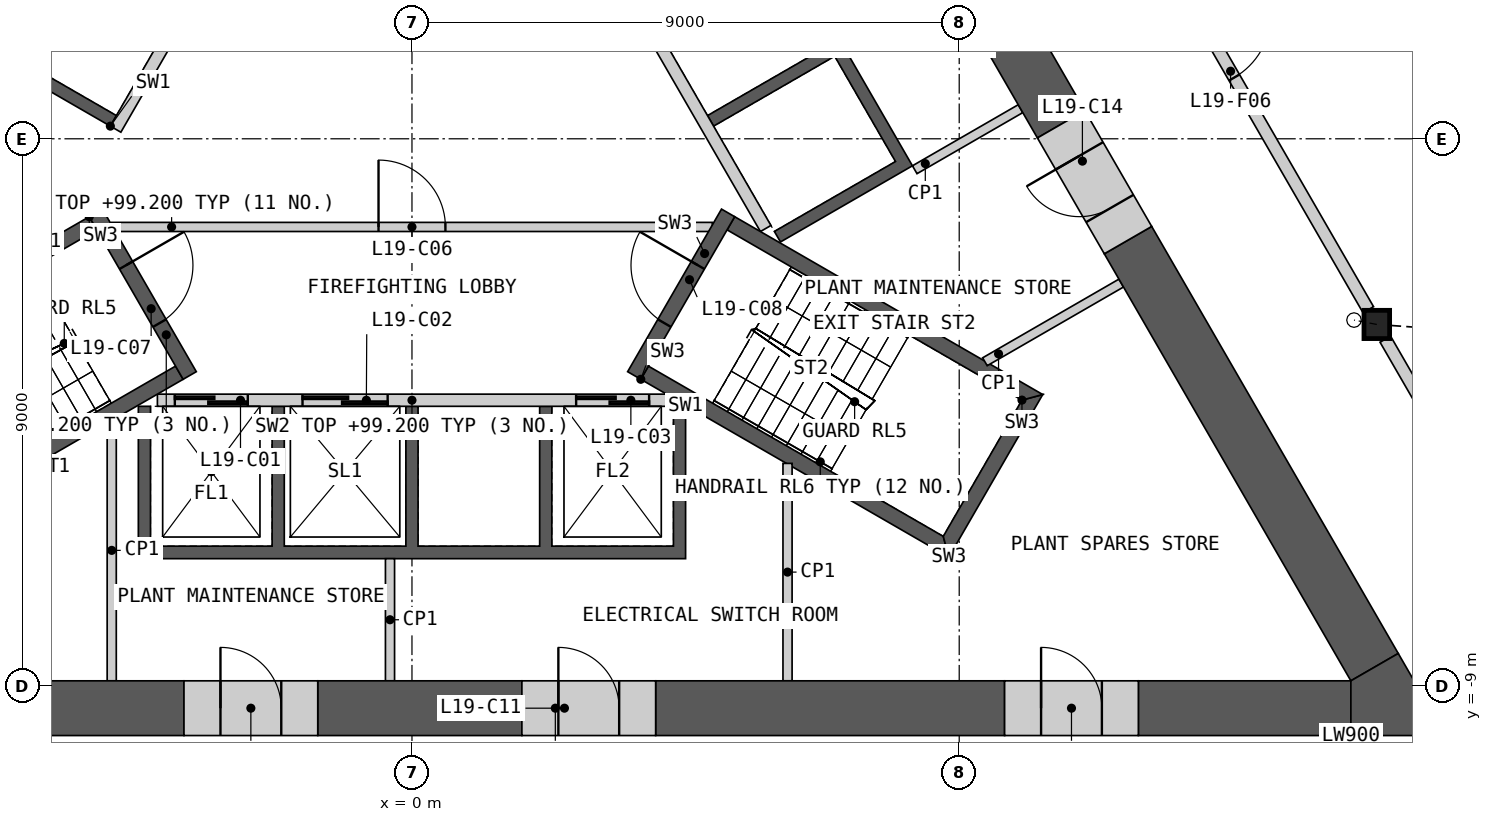
"""IFC4 building model, lengths in metres.
Left out: names, types, materials, properties, quantities, classifications, styles, units other than length and angle.
Written with IfcOpenShell. Run it as: python <this file> out.ifc"""

import sys

from ifc_helpers import new_model, si_unit, direction, frame, frame_2d, origin, origin_2d, place, context, subcontext, project, spatial, polyline, rectangle, i_section, outline, extrude, element, fill, save


model = new_model("IFC4")
c1 = context("Model", 3, precision=1e-05, world=origin(), true_north=direction((0.0, 1.0)))
c2 = subcontext(c1, "Body", "Model", "MODEL_VIEW")
j1 = project(units=[si_unit("LENGTHUNIT", "METRE"), si_unit("PLANEANGLEUNIT", "RADIAN")], contexts=[c1])
p1 = place(None, origin())
s1 = spatial("IfcSite", under=j1, at=p1, CompositionType="ELEMENT")
p2 = place(p1, origin())
s2 = spatial("IfcBuilding", under=s1, at=p2, CompositionType="ELEMENT")
p3 = place(p2, frame((0.0, 0.0, 94.6)))
s3 = spatial("IfcBuildingStorey", under=s2, at=p3, CompositionType="ELEMENT", Elevation=94.6)
p4 = place(p3, frame((15.868, -3.054, 0.0), z_axis=(-0.074782233985, 0.014362473324, 0.997096453128), x_axis=(-0.188610251533, -0.982052021543, 0.0)))
e1 = element("IfcColumn", 1, at=p4, inside=s3, PredefinedType="COLUMN", context=c2, shape_type="SweptSolid", body=[
    extrude(i_section(OverallWidth=0.421, OverallDepth=0.465, WebThickness=0.045, FlangeThickness=0.072, at=origin_2d()), frame((0.0, 0.0, 0.018)), (0.0, 0.0, 1.0), 4.979),
])
p5 = place(p3, origin())
e2 = element("IfcWall", 2, at=p5, inside=s3, PredefinedType="SHEAR", context=c2, shape_type="SweptSolid", body=[
    extrude(outline(polyline([(4.5, -4.4), (4.5, -6.906), (-4.5, -6.906), (-4.5, -4.4), (-4.3, -4.4), (-4.3, -6.7), (-2.3, -6.7), (-2.3, -4.4), (-2.1, -4.4), (-2.1, -6.7), (-0.1, -6.7), (-0.1, -4.4), (0.1, -4.4), (0.1, -6.7), (2.1, -6.7), (2.1, -4.4), (2.3, -4.4), (2.3, -6.7), (4.3, -6.7), (4.3, -4.4), (4.5, -4.4)])), origin(), (0.0, 0.0, 1.0), 4.6),
])
p6 = place(p3, frame((-4.187, -4.3, 0.0), z_axis=(0.0, 0.0, 1.0), x_axis=(1.0, 0.0, 0.0)))
e3 = element("IfcWall", 3, at=p6, inside=s3, PredefinedType="SOLIDWALL", context=c2, shape_type="SweptSolid", body=[
    extrude(rectangle(XDim=8.373, YDim=0.2, at=frame_2d((4.187, 0.0))), origin(), (0.0, 0.0, 1.0), 4.6),
])
p7 = place(p6, frame((0.287, 0.0, 0.0)))
e4 = element("IfcOpeningElement", 4, at=p7, cuts=e3, PredefinedType="OPENING", context=c2, shape_type="SweptSolid", body=[
    extrude(rectangle(XDim=1.2, YDim=2.1, at=frame_2d((0.6, 1.05))), frame((0.0, 0.11, 0.0), z_axis=(0.0, -1.0, 0.0), x_axis=(1.0, 0.0, 0.0)), (0.0, 0.0, 1.0), 0.22),
])
p8 = place(p6, frame((2.387, 0.0, 0.0)))
e5 = element("IfcOpeningElement", 5, at=p8, cuts=e3, PredefinedType="OPENING", context=c2, shape_type="SweptSolid", body=[
    extrude(rectangle(XDim=1.4, YDim=2.1, at=frame_2d((0.7, 1.05))), frame((0.0, 0.11, 0.0), z_axis=(0.0, -1.0, 0.0), x_axis=(1.0, 0.0, 0.0)), (0.0, 0.0, 1.0), 0.22),
])
p9 = place(p6, frame((6.887, 0.0, 0.0)))
e6 = element("IfcOpeningElement", 6, at=p9, cuts=e3, PredefinedType="OPENING", context=c2, shape_type="SweptSolid", body=[
    extrude(rectangle(XDim=1.2, YDim=2.1, at=frame_2d((0.6, 1.05))), frame((0.0, 0.11, 0.0), z_axis=(0.0, -1.0, 0.0), x_axis=(1.0, 0.0, 0.0)), (0.0, 0.0, 1.0), 0.22),
])
p10 = place(p3, origin())
e7 = element("IfcWall", 7, at=p10, inside=s3, PredefinedType="SHEAR", context=c2, shape_type="SweptSolid", body=[
    extrude(outline(polyline([(2.66, 4.192), (4.831, 5.445), (8.231, -0.444), (6.061, -1.697), (5.96, -1.524), (7.952, -0.374), (6.952, 1.358), (4.96, 0.208), (4.861, 0.381), (6.852, 1.531), (5.852, 3.263), (3.861, 2.113), (3.76, 2.287), (5.752, 3.437), (4.752, 5.169), (2.76, 4.019), (2.66, 4.192)])), origin(), (0.0, 0.0, 1.0), 4.6),
])
p11 = place(p3, frame((5.817, -1.476, 0.0), z_axis=(0.0, 0.0, 1.0), x_axis=(-0.500002616675, 0.866023893041, 0.0)))
e8 = element("IfcWall", 8, at=p11, inside=s3, PredefinedType="SOLIDWALL", context=c2, shape_type="SweptSolid", body=[
    extrude(rectangle(XDim=8.373, YDim=0.2, at=frame_2d((4.187, 0.0))), origin(), (0.0, 0.0, 1.0), 4.6),
])
p12 = place(p11, frame((7.037, 0.0, 0.0)))
e9 = element("IfcOpeningElement", 9, at=p12, cuts=e8, PredefinedType="OPENING", context=c2, shape_type="SweptSolid", body=[
    extrude(rectangle(XDim=0.9, YDim=2.1, at=frame_2d((0.45, 1.05))), frame((0.0, 0.11, 0.0), z_axis=(0.0, -1.0, 0.0), x_axis=(1.0, 0.0, 0.0)), (0.0, 0.0, 1.0), 0.22),
])
p13 = place(p3, origin())
e10 = element("IfcWall", 10, at=p13, inside=s3, PredefinedType="SHEAR", context=c2, shape_type="SweptSolid", body=[
    extrude(outline(polyline([(-4.96, 0.208), (-7.131, 1.461), (-3.731, 7.35), (-1.561, 6.097), (-1.66, 5.924), (-3.652, 7.074), (-5.752, 3.437), (-3.76, 2.287), (-3.861, 2.113), (-5.852, 3.263), (-6.852, 1.531), (-4.861, 0.381), (-4.96, 0.208)])), origin(), (0.0, 0.0, 1.0), 4.6),
])
p14 = place(p3, frame((-1.631, 5.776, 0.0), z_axis=(0.0, 0.0, 1.0), x_axis=(-0.499992876559, -0.866029516466, 0.0)))
e11 = element("IfcWall", 11, at=p14, inside=s3, PredefinedType="SOLIDWALL", context=c2, shape_type="SweptSolid", body=[
    extrude(rectangle(XDim=6.486, YDim=0.2, at=frame_2d((3.243, 0.0))), origin(), (0.0, 0.0, 1.0), 4.6),
])
p15 = place(p14, frame((1.537, 0.0, 0.0)))
e12 = element("IfcOpeningElement", 12, at=p15, cuts=e11, PredefinedType="OPENING", context=c2, shape_type="SweptSolid", body=[
    extrude(rectangle(XDim=0.9, YDim=2.1, at=frame_2d((0.45, 1.05))), frame((0.0, 0.11, 0.0), z_axis=(0.0, -1.0, 0.0), x_axis=(1.0, 0.0, 0.0)), (0.0, 0.0, 1.0), 0.22),
])
p16 = place(p3, frame((-4.941, -1.45, 0.0), z_axis=(0.0, 0.0, 1.0), x_axis=(1.0, 0.0, 0.0)))
e13 = element("IfcWall", 13, at=p16, inside=s3, PredefinedType="PARTITIONING", context=c2, shape_type="SweptSolid", body=[
    extrude(rectangle(XDim=9.882, YDim=0.15, at=frame_2d((4.941, 0.0))), origin(), (0.0, 0.0, 1.0), 4.6),
])
p17 = place(p16, frame((4.391, 0.0, 0.0)))
e14 = element("IfcOpeningElement", 14, at=p17, cuts=e13, PredefinedType="OPENING", context=c2, shape_type="SweptSolid", body=[
    extrude(rectangle(XDim=1.1, YDim=2.1, at=frame_2d((0.55, 1.05))), frame((0.0, 0.085, 0.0), z_axis=(0.0, -1.0, 0.0), x_axis=(1.0, 0.0, 0.0)), (0.0, 0.0, 1.0), 0.17),
])
p18 = place(p3, origin())
e15 = element("IfcWall", 15, at=p18, inside=s3, PredefinedType="SHEAR", context=c2, shape_type="SweptSolid", body=[
    extrude(outline(polyline([(-5.307, -1.281), (-10.374, -4.206), (-10.032, -4.298), (-5.182, -1.498), (-5.307, -1.281)])), origin(), (0.0, 0.0, 1.0), 4.6),
])
p19 = place(p3, origin())
e16 = element("IfcWall", 16, at=p19, inside=s3, PredefinedType="SHEAR", context=c2, shape_type="SweptSolid", body=[
    extrude(outline(polyline([(-8.738, -6.539), (-8.83, -6.881), (-3.763, -3.956), (-3.888, -3.739), (-8.738, -6.539)])), origin(), (0.0, 0.0, 1.0), 4.6),
])
p20 = place(p3, frame((-5.199, -1.219, 0.0), z_axis=(0.0, 0.0, 1.0), x_axis=(0.499982516597, -0.866035497597, 0.0)))
e17 = element("IfcWall", 17, at=p20, inside=s3, PredefinedType="SHEAR", context=c2, shape_type="SweptSolid", body=[
    extrude(rectangle(XDim=3.088, YDim=0.25, at=frame_2d((1.544, 0.0))), origin(), (0.0, 0.0, 1.0), 4.6),
])
p21 = place(p20, frame((0.994, 0.0, 0.0)))
e18 = element("IfcOpeningElement", 18, at=p21, cuts=e17, PredefinedType="OPENING", context=c2, shape_type="SweptSolid", body=[
    extrude(rectangle(XDim=1.1, YDim=2.1, at=frame_2d((0.55, 1.05))), frame((0.0, 0.135, 0.0), z_axis=(0.0, -1.0, 0.0), x_axis=(1.0, 0.0, 0.0)), (0.0, 0.0, 1.0), 0.27),
])
p22 = place(p3, origin())
e19 = element("IfcWall", 19, at=p22, inside=s3, PredefinedType="SHEAR", context=c2, shape_type="SweptSolid", body=[
    extrude(outline(polyline([(3.763, -3.956), (8.83, -6.881), (8.738, -6.539), (3.888, -3.739), (3.763, -3.956)])), origin(), (0.0, 0.0, 1.0), 4.6),
])
p23 = place(p3, origin())
e20 = element("IfcWall", 20, at=p23, inside=s3, PredefinedType="SHEAR", context=c2, shape_type="SweptSolid", body=[
    extrude(outline(polyline([(8.83, -6.881), (10.374, -4.206), (10.032, -4.298), (8.738, -6.539), (8.83, -6.881)])), origin(), (0.0, 0.0, 1.0), 4.6),
])
p24 = place(p3, origin())
e21 = element("IfcWall", 21, at=p24, inside=s3, PredefinedType="SHEAR", context=c2, shape_type="SweptSolid", body=[
    extrude(outline(polyline([(10.032, -4.298), (10.374, -4.206), (5.307, -1.281), (5.182, -1.498), (10.032, -4.298)])), origin(), (0.0, 0.0, 1.0), 4.6),
])
p25 = place(p3, frame((3.655, -3.893, 0.0), z_axis=(0.0, 0.0, 1.0), x_axis=(0.499982516597, 0.866035497597, 0.0)))
e22 = element("IfcWall", 22, at=p25, inside=s3, PredefinedType="SHEAR", context=c2, shape_type="SweptSolid", body=[
    extrude(rectangle(XDim=3.088, YDim=0.25, at=frame_2d((1.544, 0.0))), origin(), (0.0, 0.0, 1.0), 4.6),
])
p26 = place(p25, frame((0.994, 0.0, 0.0)))
e23 = element("IfcOpeningElement", 23, at=p26, cuts=e22, PredefinedType="OPENING", context=c2, shape_type="SweptSolid", body=[
    extrude(rectangle(XDim=1.1, YDim=2.1, at=frame_2d((0.55, 1.05))), frame((0.0, 0.135, 0.0), z_axis=(0.0, -1.0, 0.0), x_axis=(1.0, 0.0, 0.0)), (0.0, 0.0, 1.0), 0.27),
])
p27 = place(p3, frame((8.268, -0.509, 0.0), z_axis=(0.0, 0.0, 1.0), x_axis=(0.866035824272, 0.499981950752, 0.0)))
e24 = element("IfcWall", 24, at=p27, inside=s3, PredefinedType="PARTITIONING", context=c2, shape_type="SweptSolid", body=[
    extrude(rectangle(XDim=2.009, YDim=0.15, at=frame_2d((1.004, 0.0))), origin(), (0.0, 0.0, 1.0), 4.6),
])
p28 = place(p3, frame((6.177, -8.915, 0.0), z_axis=(0.0, 0.0, 1.0), x_axis=(0.0, 1.0, 0.0)))
e25 = element("IfcWall", 25, at=p28, inside=s3, PredefinedType="PARTITIONING", context=c2, shape_type="SweptSolid", body=[
    extrude(rectangle(XDim=3.576, YDim=0.15, at=frame_2d((1.788, 0.0))), origin(), (0.0, 0.0, 1.0), 4.6),
])
p29 = place(p3, frame((-0.361, -8.915, 0.0), z_axis=(0.0, 0.0, 1.0), x_axis=(0.0, 1.0, 0.0)))
e26 = element("IfcWall", 26, at=p29, inside=s3, PredefinedType="PARTITIONING", context=c2, shape_type="SweptSolid", body=[
    extrude(rectangle(XDim=2.009, YDim=0.15, at=frame_2d((1.004, 0.0))), origin(), (0.0, 0.0, 1.0), 4.6),
])
p30 = place(p3, frame((11.664, -2.373, 0.0), z_axis=(0.0, 0.0, 1.0), x_axis=(-0.866034804124, -0.499983717781, 0.0)))
e27 = element("IfcWall", 27, at=p30, inside=s3, PredefinedType="PARTITIONING", context=c2, shape_type="SweptSolid", body=[
    extrude(rectangle(XDim=2.588, YDim=0.15, at=frame_2d((1.294, 0.0))), origin(), (0.0, 0.0, 1.0), 4.6),
])
p31 = place(p3, frame((-4.938, -8.915, 0.0), z_axis=(0.0, 0.0, 1.0), x_axis=(0.0, 1.0, 0.0)))
e28 = element("IfcWall", 28, at=p31, inside=s3, PredefinedType="PARTITIONING", context=c2, shape_type="SweptSolid", body=[
    extrude(rectangle(XDim=4.291, YDim=0.15, at=frame_2d((2.146, 0.0))), origin(), (0.0, 0.0, 1.0), 4.6),
])
p32 = place(p3, frame((-15.441, -9.365, 0.0), z_axis=(0.0, 0.0, 1.0), x_axis=(1.0, 0.0, 0.0)))
e29 = element("IfcWall", 29, at=p32, inside=s3, PredefinedType="SHEAR", context=c2, shape_type="SweptSolid", body=[
    extrude(rectangle(XDim=11.692, YDim=0.9, at=frame_2d((5.846, 0.0))), origin(), (0.0, 0.0, 1.0), 4.6),
])
p33 = place(p3, frame((4.008, -9.365, 0.0), z_axis=(0.0, 0.0, 1.0), x_axis=(1.0, 0.0, 0.0)))
e30 = element("IfcWall", 30, at=p33, inside=s3, PredefinedType="SHEAR", context=c2, shape_type="SweptSolid", body=[
    extrude(rectangle(XDim=5.739, YDim=0.9, at=frame_2d((2.869, 0.0))), origin(), (0.0, 0.0, 1.0), 4.6),
])
p34 = place(p3, frame((11.946, -9.365, 0.0), z_axis=(0.0, 0.0, 1.0), x_axis=(1.0, 0.0, 0.0)))
e31 = element("IfcWall", 31, at=p34, inside=s3, PredefinedType="SHEAR", context=c2, shape_type="SweptSolid", body=[
    extrude(rectangle(XDim=3.495, YDim=0.9, at=frame_2d((1.748, 0.0))), origin(), (0.0, 0.0, 1.0), 4.6),
])
p35 = place(p3, frame((-1.55, -9.365, 0.0), z_axis=(0.0, 0.0, 1.0), x_axis=(1.0, 0.0, 0.0)))
e32 = element("IfcWall", 32, at=p35, inside=s3, PredefinedType="SHEAR", context=c2, shape_type="SweptSolid", body=[
    extrude(rectangle(XDim=3.357, YDim=0.9, at=frame_2d((1.679, 0.0))), origin(), (0.0, 0.0, 1.0), 4.6),
])
p36 = place(p3, frame((15.831, -8.69, 0.0), z_axis=(0.0, 0.0, 1.0), x_axis=(-0.499995201193, 0.866028174359, 0.0)))
e33 = element("IfcWall", 33, at=p36, inside=s3, PredefinedType="SHEAR", context=c2, shape_type="SweptSolid", body=[
    extrude(rectangle(XDim=8.11, YDim=0.9, at=frame_2d((4.055, 0.0))), origin(), (0.0, 0.0, 1.0), 4.6),
])
p37 = place(p3, frame((10.676, 0.239, 0.0), z_axis=(0.0, 0.0, 1.0), x_axis=(-0.499978737809, 0.866037679168, 0.0)))
e34 = element("IfcWall", 34, at=p37, inside=s3, PredefinedType="SHEAR", context=c2, shape_type="SweptSolid", body=[
    extrude(rectangle(XDim=2.831, YDim=0.9, at=frame_2d((1.416, 0.0))), origin(), (0.0, 0.0, 1.0), 4.6),
])
p38 = place(p3, origin())
e35 = element("IfcWall", 35, at=p38, inside=s3, PredefinedType="SHEAR", context=c2, shape_type="SweptSolid", body=[
    extrude(outline(polyline([(15.441, -9.815), (15.441, -8.915), (16.221, -8.465), (17.0, -9.815), (15.441, -9.815)])), origin(), (0.0, 0.0, 1.0), 4.6),
])
p39 = place(p3, frame((-3.75, -9.365, 0.0), z_axis=(0.0, 0.0, 1.0), x_axis=(1.0, 0.0, 0.0)))
e36 = element("IfcWall", 36, at=p39, inside=s3, PredefinedType="SHEAR", context=c2, shape_type="SweptSolid", body=[
    extrude(rectangle(XDim=2.2, YDim=0.9, at=frame_2d((1.1, 0.0))), origin(), (0.0, 0.0, 1.0), 4.6),
])
p40 = place(p39, frame((0.6, 0.0, 0.0)))
e37 = element("IfcOpeningElement", 37, at=p40, cuts=e36, PredefinedType="OPENING", context=c2, shape_type="SweptSolid", body=[
    extrude(rectangle(XDim=1.0, YDim=2.1, at=frame_2d((0.5, 1.05))), frame((0.0, 0.46, 0.0), z_axis=(0.0, -1.0, 0.0), x_axis=(1.0, 0.0, 0.0)), (0.0, 0.0, 1.0), 0.92),
])
p41 = place(p3, frame((1.808, -9.365, 0.0), z_axis=(0.0, 0.0, 1.0), x_axis=(1.0, 0.0, 0.0)))
e38 = element("IfcWall", 38, at=p41, inside=s3, PredefinedType="SHEAR", context=c2, shape_type="SweptSolid", body=[
    extrude(rectangle(XDim=2.2, YDim=0.9, at=frame_2d((1.1, 0.0))), origin(), (0.0, 0.0, 1.0), 4.6),
])
p42 = place(p41, frame((0.6, 0.0, 0.0)))
e39 = element("IfcOpeningElement", 39, at=p42, cuts=e38, PredefinedType="OPENING", context=c2, shape_type="SweptSolid", body=[
    extrude(rectangle(XDim=1.0, YDim=2.1, at=frame_2d((0.5, 1.05))), frame((0.0, 0.46, 0.0), z_axis=(0.0, -1.0, 0.0), x_axis=(1.0, 0.0, 0.0)), (0.0, 0.0, 1.0), 0.92),
])
p43 = place(p3, frame((9.746, -9.365, 0.0), z_axis=(0.0, 0.0, 1.0), x_axis=(1.0, 0.0, 0.0)))
e40 = element("IfcWall", 40, at=p43, inside=s3, PredefinedType="SHEAR", context=c2, shape_type="SweptSolid", body=[
    extrude(rectangle(XDim=2.2, YDim=0.9, at=frame_2d((1.1, 0.0))), origin(), (0.0, 0.0, 1.0), 4.6),
])
p44 = place(p43, frame((0.6, 0.0, 0.0)))
e41 = element("IfcOpeningElement", 41, at=p44, cuts=e40, PredefinedType="OPENING", context=c2, shape_type="SweptSolid", body=[
    extrude(rectangle(XDim=1.0, YDim=2.1, at=frame_2d((0.5, 1.05))), frame((0.0, 0.46, 0.0), z_axis=(0.0, -1.0, 0.0), x_axis=(1.0, 0.0, 0.0)), (0.0, 0.0, 1.0), 0.92),
])
p45 = place(p3, frame((11.776, -1.667, 0.0), z_axis=(0.0, 0.0, 1.0), x_axis=(-0.50002983664, 0.866008176907, 0.0)))
e42 = element("IfcWall", 42, at=p45, inside=s3, PredefinedType="SHEAR", context=c2, shape_type="SweptSolid", body=[
    extrude(rectangle(XDim=2.2, YDim=0.9, at=frame_2d((1.1, 0.0))), origin(), (0.0, 0.0, 1.0), 4.6),
])
p46 = place(p45, frame((0.6, 0.0, 0.0)))
e43 = element("IfcOpeningElement", 43, at=p46, cuts=e42, PredefinedType="OPENING", context=c2, shape_type="SweptSolid", body=[
    extrude(rectangle(XDim=1.0, YDim=2.1, at=frame_2d((0.5, 1.05))), frame((0.0, 0.46, 0.0), z_axis=(0.0, -1.0, 0.0), x_axis=(1.0, 0.0, 0.0)), (0.0, 0.0, 1.0), 0.92),
])
p47 = place(p3, frame((10.719, 5.865, 0.0), z_axis=(0.0, 0.0, 1.0), x_axis=(0.49999175339, -0.866030164915, 0.0)))
e44 = element("IfcWall", 44, at=p47, inside=s3, PredefinedType="PARTITIONING", context=c2, shape_type="SweptSolid", body=[
    extrude(rectangle(XDim=10.019, YDim=0.2, at=frame_2d((5.009, 0.0))), origin(), (0.0, 0.0, 1.0), 4.6),
])
p48 = place(p47, frame((4.409, 0.0, 0.0)))
e45 = element("IfcOpeningElement", 45, at=p48, cuts=e44, PredefinedType="OPENING", context=c2, shape_type="SweptSolid", body=[
    extrude(rectangle(XDim=1.2, YDim=2.1, at=frame_2d((0.6, 1.05))), frame((0.0, 0.11, 0.0), z_axis=(0.0, -1.0, 0.0), x_axis=(1.0, 0.0, 0.0)), (0.0, 0.0, 1.0), 0.22),
])
p49 = place(p3, frame((16.008, -3.296, 0.0), z_axis=(0.0, 0.0, 1.0), x_axis=(0.499984737558, -0.86603421538, 0.0)))
e46 = element("IfcWall", 46, at=p49, inside=s3, PredefinedType="PARTITIONING", context=c2, shape_type="SweptSolid", body=[
    extrude(rectangle(XDim=6.473, YDim=0.2, at=frame_2d((3.236, 0.0))), origin(), (0.0, 0.0, 1.0), 4.6),
])
p50 = place(p7, origin())
e47 = element("IfcDoor", 47, at=p50, inside=s3, OperationType="SLIDING_TO_LEFT", PredefinedType="DOOR", context=c2, shape_type="SweptSolid", body=[
    extrude(rectangle(XDim=1.2, YDim=2.1, at=frame_2d((0.6, 1.05))), frame((0.0, 0.025, 0.0), z_axis=(0.0, -1.0, 0.0), x_axis=(1.0, 0.0, 0.0)), (0.0, 0.0, 1.0), 0.05),
])
fill(e4, e47)
p51 = place(p8, origin())
e48 = element("IfcDoor", 48, at=p51, inside=s3, OperationType="SLIDING_TO_LEFT", PredefinedType="DOOR", context=c2, shape_type="SweptSolid", body=[
    extrude(rectangle(XDim=1.4, YDim=2.1, at=frame_2d((0.7, 1.05))), frame((0.0, 0.025, 0.0), z_axis=(0.0, -1.0, 0.0), x_axis=(1.0, 0.0, 0.0)), (0.0, 0.0, 1.0), 0.05),
])
fill(e5, e48)
p52 = place(p9, origin())
e49 = element("IfcDoor", 49, at=p52, inside=s3, OperationType="SLIDING_TO_LEFT", PredefinedType="DOOR", context=c2, shape_type="SweptSolid", body=[
    extrude(rectangle(XDim=1.2, YDim=2.1, at=frame_2d((0.6, 1.05))), frame((0.0, 0.025, 0.0), z_axis=(0.0, -1.0, 0.0), x_axis=(1.0, 0.0, 0.0)), (0.0, 0.0, 1.0), 0.05),
])
fill(e6, e49)
p53 = place(p17, origin())
e50 = element("IfcDoor", 50, at=p53, inside=s3, OperationType="SINGLE_SWING_LEFT", PredefinedType="DOOR", context=c2, shape_type="SweptSolid", body=[
    extrude(rectangle(XDim=1.1, YDim=2.1, at=frame_2d((0.55, 1.05))), frame((0.0, 0.025, 0.0), z_axis=(0.0, -1.0, 0.0), x_axis=(1.0, 0.0, 0.0)), (0.0, 0.0, 1.0), 0.05),
])
fill(e14, e50)
p54 = place(p21, origin())
e51 = element("IfcDoor", 51, at=p54, inside=s3, OperationType="SINGLE_SWING_LEFT", PredefinedType="DOOR", context=c2, shape_type="SweptSolid", body=[
    extrude(rectangle(XDim=1.1, YDim=2.1, at=frame_2d((0.55, 1.05))), frame((0.0, 0.025, 0.0), z_axis=(0.0, -1.0, 0.0), x_axis=(1.0, 0.0, 0.0)), (0.0, 0.0, 1.0), 0.05),
])
fill(e18, e51)
p55 = place(p26, origin())
e52 = element("IfcDoor", 52, at=p55, inside=s3, OperationType="SINGLE_SWING_RIGHT", PredefinedType="DOOR", context=c2, shape_type="SweptSolid", body=[
    extrude(rectangle(XDim=1.1, YDim=2.1, at=frame_2d((0.55, 1.05))), frame((0.0, 0.025, 0.0), z_axis=(0.0, -1.0, 0.0), x_axis=(1.0, 0.0, 0.0)), (0.0, 0.0, 1.0), 0.05),
])
fill(e23, e52)
p56 = place(p40, origin())
e53 = element("IfcDoor", 53, at=p56, inside=s3, OperationType="SINGLE_SWING_LEFT", PredefinedType="DOOR", context=c2, shape_type="SweptSolid", body=[
    extrude(rectangle(XDim=1.0, YDim=2.1, at=frame_2d((0.5, 1.05))), frame((0.0, 0.205, 0.0), z_axis=(0.0, -1.0, 0.0), x_axis=(1.0, 0.0, 0.0)), (0.0, 0.0, 1.0), 0.05),
])
fill(e37, e53)
p57 = place(p42, origin())
e54 = element("IfcDoor", 54, at=p57, inside=s3, OperationType="SINGLE_SWING_LEFT", PredefinedType="DOOR", context=c2, shape_type="SweptSolid", body=[
    extrude(rectangle(XDim=1.0, YDim=2.1, at=frame_2d((0.5, 1.05))), frame((0.0, 0.205, 0.0), z_axis=(0.0, -1.0, 0.0), x_axis=(1.0, 0.0, 0.0)), (0.0, 0.0, 1.0), 0.05),
])
fill(e39, e54)
p58 = place(p44, origin())
e55 = element("IfcDoor", 55, at=p58, inside=s3, OperationType="SINGLE_SWING_LEFT", PredefinedType="DOOR", context=c2, shape_type="SweptSolid", body=[
    extrude(rectangle(XDim=1.0, YDim=2.1, at=frame_2d((0.5, 1.05))), frame((0.0, 0.205, 0.0), z_axis=(0.0, -1.0, 0.0), x_axis=(1.0, 0.0, 0.0)), (0.0, 0.0, 1.0), 0.05),
])
fill(e41, e55)
p59 = place(p46, origin())
e56 = element("IfcDoor", 56, at=p59, inside=s3, OperationType="SINGLE_SWING_RIGHT", PredefinedType="DOOR", context=c2, shape_type="SweptSolid", body=[
    extrude(rectangle(XDim=1.0, YDim=2.1, at=frame_2d((0.5, 1.05))), frame((0.0, 0.205, 0.0), z_axis=(0.0, -1.0, 0.0), x_axis=(1.0, 0.0, 0.0)), (0.0, 0.0, 1.0), 0.05),
])
fill(e43, e56)
p60 = place(p48, origin())
e57 = element("IfcDoor", 57, at=p60, inside=s3, OperationType="SINGLE_SWING_LEFT", PredefinedType="DOOR", context=c2, shape_type="SweptSolid", body=[
    extrude(rectangle(XDim=1.2, YDim=2.1, at=frame_2d((0.6, 1.05))), frame((0.0, 0.025, 0.0), z_axis=(0.0, -1.0, 0.0), x_axis=(1.0, 0.0, 0.0)), (0.0, 0.0, 1.0), 0.05),
])
fill(e45, e57)
save(model, sys.argv[1])
